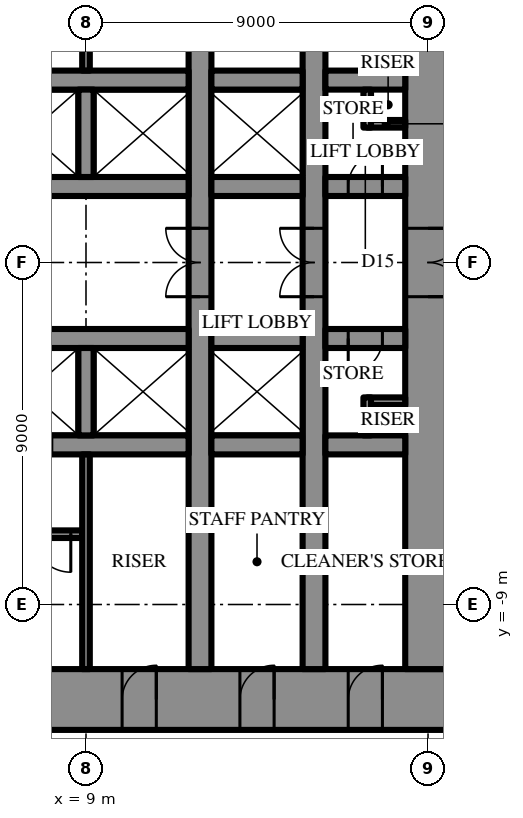
"""IFC4 building model, lengths in metres.
Left out: names, types, materials, properties, quantities, classifications, styles, units other than length and angle.
Written with IfcOpenShell. Run it as: python <this file> out.ifc"""

import sys

from ifc_helpers import new_model, si_unit, direction, frame, frame_2d, origin, place, context, subcontext, project, spatial, rectangle, extrude, element, fill, save


model = new_model("IFC4")
c1 = context("Model", 3, precision=1e-05, world=origin(), true_north=direction((0.0, 1.0)))
c2 = subcontext(c1, "Body", "Model", "MODEL_VIEW")
j1 = project(units=[si_unit("LENGTHUNIT", "METRE"), si_unit("PLANEANGLEUNIT", "RADIAN")], contexts=[c1])
p1 = place(None, origin())
s1 = spatial("IfcSite", under=j1, at=p1, CompositionType="ELEMENT")
p2 = place(p1, origin())
s2 = spatial("IfcBuilding", under=s1, at=p2, CompositionType="ELEMENT")
p3 = place(p2, frame((0.0, 0.0, 174.1)))
s3 = spatial("IfcBuildingStorey", under=s2, at=p3, CompositionType="ELEMENT", Elevation=174.1)
p4 = place(p3, frame((18.6, -11.5, 0.0), z_axis=(0.0, 0.0, 1.0), x_axis=(-1.0, 0.0, 0.0)))
e1 = element("IfcWall", 1, at=p4, inside=s3, PredefinedType="SHEAR", context=c2, shape_type="SweptSolid", body=[
    extrude(rectangle(XDim=37.2, YDim=1.6, at=frame_2d((18.6, 0.0))), origin(), (0.0, 0.0, 1.0), 4.2),
])
p5 = place(p4, frame((19.45, 0.0, 0.0)))
e2 = element("IfcOpeningElement", 2, at=p5, cuts=e1, PredefinedType="OPENING", context=c2, shape_type="SweptSolid", body=[
    extrude(rectangle(XDim=0.9, YDim=2.2, at=frame_2d((0.45, 1.1))), frame((0.0, 0.81, 0.0), z_axis=(0.0, -1.0, 0.0), x_axis=(1.0, 0.0, 0.0)), (0.0, 0.0, 1.0), 1.62),
])
p6 = place(p4, frame((22.45, 0.0, 0.0)))
e3 = element("IfcOpeningElement", 3, at=p6, cuts=e1, PredefinedType="OPENING", context=c2, shape_type="SweptSolid", body=[
    extrude(rectangle(XDim=0.9, YDim=2.2, at=frame_2d((0.45, 1.1))), frame((0.0, 0.81, 0.0), z_axis=(0.0, -1.0, 0.0), x_axis=(1.0, 0.0, 0.0)), (0.0, 0.0, 1.0), 1.62),
])
p7 = place(p4, frame((25.5, 0.0, 0.0)))
e4 = element("IfcOpeningElement", 4, at=p7, cuts=e1, PredefinedType="OPENING", context=c2, shape_type="SweptSolid", body=[
    extrude(rectangle(XDim=1.0, YDim=2.2, at=frame_2d((0.5, 1.1))), frame((0.0, 0.81, 0.0), z_axis=(0.0, -1.0, 0.0), x_axis=(1.0, 0.0, 0.0)), (0.0, 0.0, 1.0), 1.62),
])
p8 = place(p4, frame((1.8, 0.0, 0.0)))
e5 = element("IfcOpeningElement", 5, at=p8, cuts=e1, PredefinedType="OPENING", context=c2, shape_type="SweptSolid", body=[
    extrude(rectangle(XDim=0.9, YDim=2.2, at=frame_2d((0.45, 1.1))), frame((0.0, 0.81, 0.0), z_axis=(0.0, -1.0, 0.0), x_axis=(1.0, 0.0, 0.0)), (0.0, 0.0, 1.0), 1.62),
])
p9 = place(p4, frame((4.65, 0.0, 0.0)))
e6 = element("IfcOpeningElement", 6, at=p9, cuts=e1, PredefinedType="OPENING", context=c2, shape_type="SweptSolid", body=[
    extrude(rectangle(XDim=0.9, YDim=2.2, at=frame_2d((0.45, 1.1))), frame((0.0, 0.81, 0.0), z_axis=(0.0, -1.0, 0.0), x_axis=(1.0, 0.0, 0.0)), (0.0, 0.0, 1.0), 1.62),
])
p10 = place(p4, frame((7.75, 0.0, 0.0)))
e7 = element("IfcOpeningElement", 7, at=p10, cuts=e1, PredefinedType="OPENING", context=c2, shape_type="SweptSolid", body=[
    extrude(rectangle(XDim=0.9, YDim=2.2, at=frame_2d((0.45, 1.1))), frame((0.0, 0.81, 0.0), z_axis=(0.0, -1.0, 0.0), x_axis=(1.0, 0.0, 0.0)), (0.0, 0.0, 1.0), 1.62),
])
p11 = place(p4, frame((28.55, 0.0, 0.0)))
e8 = element("IfcOpeningElement", 8, at=p11, cuts=e1, PredefinedType="OPENING", context=c2, shape_type="SweptSolid", body=[
    extrude(rectangle(XDim=0.9, YDim=2.2, at=frame_2d((0.45, 1.1))), frame((0.0, 0.81, 0.0), z_axis=(0.0, -1.0, 0.0), x_axis=(1.0, 0.0, 0.0)), (0.0, 0.0, 1.0), 1.62),
])
p12 = place(p4, frame((31.65, 0.0, 0.0)))
e9 = element("IfcOpeningElement", 9, at=p12, cuts=e1, PredefinedType="OPENING", context=c2, shape_type="SweptSolid", body=[
    extrude(rectangle(XDim=0.9, YDim=2.2, at=frame_2d((0.45, 1.1))), frame((0.0, 0.81, 0.0), z_axis=(0.0, -1.0, 0.0), x_axis=(1.0, 0.0, 0.0)), (0.0, 0.0, 1.0), 1.62),
])
p13 = place(p4, frame((34.5, 0.0, 0.0)))
e10 = element("IfcOpeningElement", 10, at=p13, cuts=e1, PredefinedType="OPENING", context=c2, shape_type="SweptSolid", body=[
    extrude(rectangle(XDim=0.9, YDim=2.2, at=frame_2d((0.45, 1.1))), frame((0.0, 0.81, 0.0), z_axis=(0.0, -1.0, 0.0), x_axis=(1.0, 0.0, 0.0)), (0.0, 0.0, 1.0), 1.62),
])
p14 = place(p3, frame((18.0, -10.7, 0.0), z_axis=(0.0, 0.0, 1.0), x_axis=(0.0, 1.0, 0.0)))
e11 = element("IfcWall", 11, at=p14, inside=s3, PredefinedType="SHEAR", context=c2, shape_type="SweptSolid", body=[
    extrude(rectangle(XDim=21.4, YDim=1.2, at=frame_2d((10.7, 0.0))), origin(), (0.0, 0.0, 1.0), 4.2),
])
p15 = place(p14, frame((9.8, 0.0, 0.0)))
e12 = element("IfcOpeningElement", 12, at=p15, cuts=e11, PredefinedType="OPENING", context=c2, shape_type="SweptSolid", body=[
    extrude(rectangle(XDim=1.8, YDim=2.4, at=frame_2d((0.9, 1.2))), frame((0.0, 0.61, 0.0), z_axis=(0.0, -1.0, 0.0), x_axis=(1.0, 0.0, 0.0)), (0.0, 0.0, 1.0), 1.22),
])
p16 = place(p3, frame((12.0, -10.7, 0.0), z_axis=(0.0, 0.0, 1.0), x_axis=(0.0, 1.0, 0.0)))
e13 = element("IfcWall", 13, at=p16, inside=s3, PredefinedType="SHEAR", context=c2, shape_type="SweptSolid", body=[
    extrude(rectangle(XDim=21.4, YDim=0.6, at=frame_2d((10.7, 0.0))), origin(), (0.0, 0.0, 1.0), 4.2),
])
p17 = place(p16, frame((9.8, 0.0, 0.0)))
e14 = element("IfcOpeningElement", 14, at=p17, cuts=e13, PredefinedType="OPENING", context=c2, shape_type="SweptSolid", body=[
    extrude(rectangle(XDim=1.8, YDim=2.4, at=frame_2d((0.9, 1.2))), frame((0.0, 0.31, 0.0), z_axis=(0.0, -1.0, 0.0), x_axis=(1.0, 0.0, 0.0)), (0.0, 0.0, 1.0), 0.62),
])
p18 = place(p3, frame((15.0, -10.7, 0.0), z_axis=(0.0, 0.0, 1.0), x_axis=(0.0, 1.0, 0.0)))
e15 = element("IfcWall", 15, at=p18, inside=s3, PredefinedType="SHEAR", context=c2, shape_type="SweptSolid", body=[
    extrude(rectangle(XDim=21.4, YDim=0.6, at=frame_2d((10.7, 0.0))), origin(), (0.0, 0.0, 1.0), 4.2),
])
p19 = place(p18, frame((9.8, 0.0, 0.0)))
e16 = element("IfcOpeningElement", 16, at=p19, cuts=e15, PredefinedType="OPENING", context=c2, shape_type="SweptSolid", body=[
    extrude(rectangle(XDim=1.8, YDim=2.4, at=frame_2d((0.9, 1.2))), frame((0.0, 0.31, 0.0), z_axis=(0.0, -1.0, 0.0), x_axis=(1.0, 0.0, 0.0)), (0.0, 0.0, 1.0), 0.62),
])
p20 = place(p3, frame((-3.2, 2.0, 0.0), z_axis=(0.0, 0.0, 1.0), x_axis=(1.0, 0.0, 0.0)))
e17 = element("IfcWall", 17, at=p20, inside=s3, PredefinedType="SHEAR", context=c2, shape_type="SweptSolid", body=[
    extrude(rectangle(XDim=14.9, YDim=0.5, at=frame_2d((7.45, 0.0))), origin(), (0.0, 0.0, 1.0), 4.2),
])
p21 = place(p20, frame((1.15, 0.0, 0.0)))
e18 = element("IfcOpeningElement", 18, at=p21, cuts=e17, PredefinedType="OPENING", context=c2, shape_type="SweptSolid", body=[
    extrude(rectangle(XDim=1.1, YDim=2.2, at=frame_2d((0.55, 1.1))), frame((0.0, 0.26, 0.0), z_axis=(0.0, -1.0, 0.0), x_axis=(1.0, 0.0, 0.0)), (0.0, 0.0, 1.0), 0.52),
])
p22 = place(p20, frame((4.15, 0.0, 0.0)))
e19 = element("IfcOpeningElement", 19, at=p22, cuts=e17, PredefinedType="OPENING", context=c2, shape_type="SweptSolid", body=[
    extrude(rectangle(XDim=1.1, YDim=2.2, at=frame_2d((0.55, 1.1))), frame((0.0, 0.26, 0.0), z_axis=(0.0, -1.0, 0.0), x_axis=(1.0, 0.0, 0.0)), (0.0, 0.0, 1.0), 0.52),
])
p23 = place(p20, frame((7.15, 0.0, 0.0)))
e20 = element("IfcOpeningElement", 20, at=p23, cuts=e17, PredefinedType="OPENING", context=c2, shape_type="SweptSolid", body=[
    extrude(rectangle(XDim=1.1, YDim=2.2, at=frame_2d((0.55, 1.1))), frame((0.0, 0.26, 0.0), z_axis=(0.0, -1.0, 0.0), x_axis=(1.0, 0.0, 0.0)), (0.0, 0.0, 1.0), 0.52),
])
p24 = place(p20, frame((10.15, 0.0, 0.0)))
e21 = element("IfcOpeningElement", 21, at=p24, cuts=e17, PredefinedType="OPENING", context=c2, shape_type="SweptSolid", body=[
    extrude(rectangle(XDim=1.1, YDim=2.2, at=frame_2d((0.55, 1.1))), frame((0.0, 0.26, 0.0), z_axis=(0.0, -1.0, 0.0), x_axis=(1.0, 0.0, 0.0)), (0.0, 0.0, 1.0), 0.52),
])
p25 = place(p3, frame((12.3, 2.0, 0.0), z_axis=(0.0, 0.0, 1.0), x_axis=(1.0, 0.0, 0.0)))
e22 = element("IfcWall", 22, at=p25, inside=s3, PredefinedType="SHEAR", context=c2, shape_type="SweptSolid", body=[
    extrude(rectangle(XDim=2.4, YDim=0.5, at=frame_2d((1.2, 0.0))), origin(), (0.0, 0.0, 1.0), 4.2),
])
p26 = place(p3, frame((15.3, 2.0, 0.0), z_axis=(0.0, 0.0, 1.0), x_axis=(1.0, 0.0, 0.0)))
e23 = element("IfcWall", 23, at=p26, inside=s3, PredefinedType="SHEAR", context=c2, shape_type="SweptSolid", body=[
    extrude(rectangle(XDim=2.1, YDim=0.5, at=frame_2d((1.05, 0.0))), origin(), (0.0, 0.0, 1.0), 4.2),
])
p27 = place(p26, frame((0.6, 0.0, 0.0)))
e24 = element("IfcOpeningElement", 24, at=p27, cuts=e23, PredefinedType="OPENING", context=c2, shape_type="SweptSolid", body=[
    extrude(rectangle(XDim=0.9, YDim=2.2, at=frame_2d((0.45, 1.1))), frame((0.0, 0.26, 0.0), z_axis=(0.0, -1.0, 0.0), x_axis=(1.0, 0.0, 0.0)), (0.0, 0.0, 1.0), 0.52),
])
p28 = place(p3, frame((-11.7, 4.8, 0.0), z_axis=(0.0, 0.0, 1.0), x_axis=(1.0, 0.0, 0.0)))
e25 = element("IfcWall", 25, at=p28, inside=s3, PredefinedType="SHEAR", context=c2, shape_type="SweptSolid", body=[
    extrude(rectangle(XDim=23.4, YDim=0.5, at=frame_2d((11.7, 0.0))), origin(), (0.0, 0.0, 1.0), 4.2),
])
p29 = place(p28, frame((6.6, 0.0, 0.0)))
e26 = element("IfcOpeningElement", 26, at=p29, cuts=e25, PredefinedType="OPENING", context=c2, shape_type="SweptSolid", body=[
    extrude(rectangle(XDim=1.2, YDim=2.2, at=frame_2d((0.6, 1.1))), frame((0.0, 0.26, 0.0), z_axis=(0.0, -1.0, 0.0), x_axis=(1.0, 0.0, 0.0)), (0.0, 0.0, 1.0), 0.52),
])
p30 = place(p28, frame((3.6, 0.0, 0.0)))
e27 = element("IfcOpeningElement", 27, at=p30, cuts=e25, PredefinedType="OPENING", context=c2, shape_type="SweptSolid", body=[
    extrude(rectangle(XDim=1.2, YDim=2.2, at=frame_2d((0.6, 1.1))), frame((0.0, 0.26, 0.0), z_axis=(0.0, -1.0, 0.0), x_axis=(1.0, 0.0, 0.0)), (0.0, 0.0, 1.0), 0.52),
])
p31 = place(p3, frame((12.3, 4.8, 0.0), z_axis=(0.0, 0.0, 1.0), x_axis=(1.0, 0.0, 0.0)))
e28 = element("IfcWall", 28, at=p31, inside=s3, PredefinedType="SHEAR", context=c2, shape_type="SweptSolid", body=[
    extrude(rectangle(XDim=2.4, YDim=0.5, at=frame_2d((1.2, 0.0))), origin(), (0.0, 0.0, 1.0), 4.2),
])
p32 = place(p3, frame((15.3, 4.8, 0.0), z_axis=(0.0, 0.0, 1.0), x_axis=(1.0, 0.0, 0.0)))
e29 = element("IfcWall", 29, at=p32, inside=s3, PredefinedType="SHEAR", context=c2, shape_type="SweptSolid", body=[
    extrude(rectangle(XDim=2.1, YDim=0.5, at=frame_2d((1.05, 0.0))), origin(), (0.0, 0.0, 1.0), 4.2),
])
p33 = place(p3, frame((9.0, 2.25, 0.0), z_axis=(0.0, 0.0, 1.0), x_axis=(0.0, 1.0, 0.0)))
e30 = element("IfcWall", 30, at=p33, inside=s3, PredefinedType="SHEAR", context=c2, shape_type="SweptSolid", body=[
    extrude(rectangle(XDim=2.3, YDim=0.4, at=frame_2d((1.15, 0.0))), origin(), (0.0, 0.0, 1.0), 4.2),
])
p34 = place(p3, frame((17.4, -2.0, 0.0), z_axis=(0.0, 0.0, 1.0), x_axis=(-1.0, 0.0, 0.0)))
e31 = element("IfcWall", 31, at=p34, inside=s3, PredefinedType="SHEAR", context=c2, shape_type="SweptSolid", body=[
    extrude(rectangle(XDim=2.1, YDim=0.5, at=frame_2d((1.05, 0.0))), origin(), (0.0, 0.0, 1.0), 4.2),
])
p35 = place(p34, frame((0.6, 0.0, 0.0)))
e32 = element("IfcOpeningElement", 32, at=p35, cuts=e31, PredefinedType="OPENING", context=c2, shape_type="SweptSolid", body=[
    extrude(rectangle(XDim=0.9, YDim=2.2, at=frame_2d((0.45, 1.1))), frame((0.0, 0.26, 0.0), z_axis=(0.0, -1.0, 0.0), x_axis=(1.0, 0.0, 0.0)), (0.0, 0.0, 1.0), 0.52),
])
p36 = place(p3, frame((14.7, -2.0, 0.0), z_axis=(0.0, 0.0, 1.0), x_axis=(-1.0, 0.0, 0.0)))
e33 = element("IfcWall", 33, at=p36, inside=s3, PredefinedType="SHEAR", context=c2, shape_type="SweptSolid", body=[
    extrude(rectangle(XDim=2.4, YDim=0.5, at=frame_2d((1.2, 0.0))), origin(), (0.0, 0.0, 1.0), 4.2),
])
p37 = place(p3, frame((11.7, -2.0, 0.0), z_axis=(0.0, 0.0, 1.0), x_axis=(-1.0, 0.0, 0.0)))
e34 = element("IfcWall", 34, at=p37, inside=s3, PredefinedType="SHEAR", context=c2, shape_type="SweptSolid", body=[
    extrude(rectangle(XDim=5.9, YDim=0.5, at=frame_2d((2.95, 0.0))), origin(), (0.0, 0.0, 1.0), 4.2),
])
p38 = place(p3, frame((17.4, -4.8, 0.0), z_axis=(0.0, 0.0, 1.0), x_axis=(-1.0, 0.0, 0.0)))
e35 = element("IfcWall", 35, at=p38, inside=s3, PredefinedType="SHEAR", context=c2, shape_type="SweptSolid", body=[
    extrude(rectangle(XDim=2.1, YDim=0.5, at=frame_2d((1.05, 0.0))), origin(), (0.0, 0.0, 1.0), 4.2),
])
p39 = place(p3, frame((14.7, -4.8, 0.0), z_axis=(0.0, 0.0, 1.0), x_axis=(-1.0, 0.0, 0.0)))
e36 = element("IfcWall", 36, at=p39, inside=s3, PredefinedType="SHEAR", context=c2, shape_type="SweptSolid", body=[
    extrude(rectangle(XDim=2.4, YDim=0.5, at=frame_2d((1.2, 0.0))), origin(), (0.0, 0.0, 1.0), 4.2),
])
p40 = place(p3, frame((11.7, -4.8, 0.0), z_axis=(0.0, 0.0, 1.0), x_axis=(-1.0, 0.0, 0.0)))
e37 = element("IfcWall", 37, at=p40, inside=s3, PredefinedType="SHEAR", context=c2, shape_type="SweptSolid", body=[
    extrude(rectangle(XDim=23.4, YDim=0.5, at=frame_2d((11.7, 0.0))), origin(), (0.0, 0.0, 1.0), 4.2),
])
p41 = place(p40, frame((6.6, 0.0, 0.0)))
e38 = element("IfcOpeningElement", 38, at=p41, cuts=e37, PredefinedType="OPENING", context=c2, shape_type="SweptSolid", body=[
    extrude(rectangle(XDim=1.2, YDim=2.2, at=frame_2d((0.6, 1.1))), frame((0.0, 0.26, 0.0), z_axis=(0.0, -1.0, 0.0), x_axis=(1.0, 0.0, 0.0)), (0.0, 0.0, 1.0), 0.52),
])
p42 = place(p40, frame((3.6, 0.0, 0.0)))
e39 = element("IfcOpeningElement", 39, at=p42, cuts=e37, PredefinedType="OPENING", context=c2, shape_type="SweptSolid", body=[
    extrude(rectangle(XDim=1.2, YDim=2.2, at=frame_2d((0.6, 1.1))), frame((0.0, 0.26, 0.0), z_axis=(0.0, -1.0, 0.0), x_axis=(1.0, 0.0, 0.0)), (0.0, 0.0, 1.0), 0.52),
])
p43 = place(p3, frame((9.0, -2.25, 0.0), z_axis=(0.0, 0.0, 1.0), x_axis=(0.0, -1.0, 0.0)))
e40 = element("IfcWall", 40, at=p43, inside=s3, PredefinedType="SHEAR", context=c2, shape_type="SweptSolid", body=[
    extrude(rectangle(XDim=2.3, YDim=0.4, at=frame_2d((1.15, 0.0))), origin(), (0.0, 0.0, 1.0), 4.2),
])
p44 = place(p3, frame((8.9, -7.15, 0.0), z_axis=(0.0, 0.0, 1.0), x_axis=(-1.0, 0.0, 0.0)))
e41 = element("IfcWall", 41, at=p44, inside=s3, PredefinedType="SHEAR", context=c2, shape_type="SweptSolid", body=[
    extrude(rectangle(XDim=8.6, YDim=0.2, at=frame_2d((4.3, 0.0))), origin(), (0.0, 0.0, 1.0), 4.2),
])
p45 = place(p44, frame((0.3, 0.0, 0.0)))
e42 = element("IfcOpeningElement", 42, at=p45, cuts=e41, PredefinedType="OPENING", context=c2, shape_type="SweptSolid", body=[
    extrude(rectangle(XDim=1.0, YDim=2.2, at=frame_2d((0.5, 1.1))), frame((0.0, 0.11, 0.0), z_axis=(0.0, -1.0, 0.0), x_axis=(1.0, 0.0, 0.0)), (0.0, 0.0, 1.0), 0.22),
])
for number, where, z_axis, x_axis in (
    (43, (9.0, 5.05, 0.0), (0.0, 0.0, 1.0), (0.0, 1.0, 0.0)),
    (44, (9.0, -5.05, 0.0), (0.0, 0.0, 1.0), (0.0, -1.0, 0.0)),
):
    element("IfcWall", number, at=place(p3, frame(where, z_axis=z_axis, x_axis=x_axis)), inside=s3, PredefinedType="PARTITIONING", context=c2, shape_type="SweptSolid", body=[
        extrude(rectangle(XDim=5.65, YDim=0.2, at=frame_2d((2.825, 0.0))), origin(), (0.0, 0.0, 1.0), 4.0),
    ])
for number, where, z_axis, x_axis in (
    (45, (16.4, 3.65, 0.0), (0.0, 0.0, 1.0), (1.0, 0.0, 0.0)),
    (46, (16.4, 3.55, 0.0), (0.0, 0.0, 1.0), (0.0, 1.0, 0.0)),
    (47, (17.4, -3.65, 0.0), (0.0, 0.0, 1.0), (-1.0, 0.0, 0.0)),
    (48, (16.4, -3.55, 0.0), (0.0, 0.0, 1.0), (0.0, -1.0, 0.0)),
):
    element("IfcWall", number, at=place(p3, frame(where, z_axis=z_axis, x_axis=x_axis)), inside=s3, PredefinedType="PARTITIONING", context=c2, shape_type="SweptSolid", body=[
        extrude(rectangle(XDim=1.0, YDim=0.2, at=frame_2d((0.5, 0.0))), origin(), (0.0, 0.0, 1.0), 4.0),
    ])
p46 = place(p15, frame((1.8, 0.0, 0.0), z_axis=(0.0, 0.0, 1.0), x_axis=(-1.0, 0.0, 0.0)))
e49 = element("IfcDoor", 49, at=p46, inside=s3, OperationType="DOUBLE_DOOR_SINGLE_SWING", PredefinedType="DOOR", context=c2, shape_type="SweptSolid", body=[
    extrude(rectangle(XDim=1.8, YDim=2.4, at=frame_2d((0.9, 1.2))), frame((0.0, 0.025, 0.0), z_axis=(0.0, -1.0, 0.0), x_axis=(1.0, 0.0, 0.0)), (0.0, 0.0, 1.0), 0.05),
])
fill(e12, e49)
p47 = place(p45, origin())
e50 = element("IfcDoor", 50, at=p47, inside=s3, OperationType="SINGLE_SWING_RIGHT", PredefinedType="DOOR", context=c2, shape_type="SweptSolid", body=[
    extrude(rectangle(XDim=1.0, YDim=2.2, at=frame_2d((0.5, 1.1))), frame((0.0, 0.025, 0.0), z_axis=(0.0, -1.0, 0.0), x_axis=(1.0, 0.0, 0.0)), (0.0, 0.0, 1.0), 0.05),
])
fill(e42, e50)
p48 = place(p8, frame((0.9, 0.0, 0.0), z_axis=(0.0, 0.0, 1.0), x_axis=(-1.0, 0.0, 0.0)))
e51 = element("IfcDoor", 51, at=p48, inside=s3, OperationType="SINGLE_SWING_LEFT", PredefinedType="DOOR", context=c2, shape_type="SweptSolid", body=[
    extrude(rectangle(XDim=0.9, YDim=2.2, at=frame_2d((0.45, 1.1))), frame((0.0, 0.025, 0.0), z_axis=(0.0, -1.0, 0.0), x_axis=(1.0, 0.0, 0.0)), (0.0, 0.0, 1.0), 0.05),
])
fill(e5, e51)
p49 = place(p9, frame((0.9, 0.0, 0.0), z_axis=(0.0, 0.0, 1.0), x_axis=(-1.0, 0.0, 0.0)))
e52 = element("IfcDoor", 52, at=p49, inside=s3, OperationType="SINGLE_SWING_LEFT", PredefinedType="DOOR", context=c2, shape_type="SweptSolid", body=[
    extrude(rectangle(XDim=0.9, YDim=2.2, at=frame_2d((0.45, 1.1))), frame((0.0, 0.025, 0.0), z_axis=(0.0, -1.0, 0.0), x_axis=(1.0, 0.0, 0.0)), (0.0, 0.0, 1.0), 0.05),
])
fill(e6, e52)
p50 = place(p10, frame((0.9, 0.0, 0.0), z_axis=(0.0, 0.0, 1.0), x_axis=(-1.0, 0.0, 0.0)))
e53 = element("IfcDoor", 53, at=p50, inside=s3, OperationType="SINGLE_SWING_LEFT", PredefinedType="DOOR", context=c2, shape_type="SweptSolid", body=[
    extrude(rectangle(XDim=0.9, YDim=2.2, at=frame_2d((0.45, 1.1))), frame((0.0, 0.025, 0.0), z_axis=(0.0, -1.0, 0.0), x_axis=(1.0, 0.0, 0.0)), (0.0, 0.0, 1.0), 0.05),
])
fill(e7, e53)
p51 = place(p27, origin())
e54 = element("IfcDoor", 54, at=p51, inside=s3, OperationType="SINGLE_SWING_LEFT", PredefinedType="DOOR", context=c2, shape_type="SweptSolid", body=[
    extrude(rectangle(XDim=0.9, YDim=2.2, at=frame_2d((0.45, 1.1))), frame((0.0, 0.025, 0.0), z_axis=(0.0, -1.0, 0.0), x_axis=(1.0, 0.0, 0.0)), (0.0, 0.0, 1.0), 0.05),
])
fill(e24, e54)
p52 = place(p35, origin())
e55 = element("IfcDoor", 55, at=p52, inside=s3, OperationType="SINGLE_SWING_LEFT", PredefinedType="DOOR", context=c2, shape_type="SweptSolid", body=[
    extrude(rectangle(XDim=0.9, YDim=2.2, at=frame_2d((0.45, 1.1))), frame((0.0, 0.025, 0.0), z_axis=(0.0, -1.0, 0.0), x_axis=(1.0, 0.0, 0.0)), (0.0, 0.0, 1.0), 0.05),
])
fill(e32, e55)
p53 = place(p17, origin())
e56 = element("IfcDoor", 56, at=p53, inside=s3, OperationType="DOUBLE_DOOR_SINGLE_SWING", PredefinedType="DOOR", context=c2, shape_type="SweptSolid", body=[
    extrude(rectangle(XDim=1.8, YDim=2.4, at=frame_2d((0.9, 1.2))), frame((0.0, 0.025, 0.0), z_axis=(0.0, -1.0, 0.0), x_axis=(1.0, 0.0, 0.0)), (0.0, 0.0, 1.0), 0.05),
])
fill(e14, e56)
p54 = place(p19, origin())
e57 = element("IfcDoor", 57, at=p54, inside=s3, OperationType="DOUBLE_DOOR_SINGLE_SWING", PredefinedType="DOOR", context=c2, shape_type="SweptSolid", body=[
    extrude(rectangle(XDim=1.8, YDim=2.4, at=frame_2d((0.9, 1.2))), frame((0.0, 0.025, 0.0), z_axis=(0.0, -1.0, 0.0), x_axis=(1.0, 0.0, 0.0)), (0.0, 0.0, 1.0), 0.05),
])
fill(e16, e57)
save(model, sys.argv[1])
